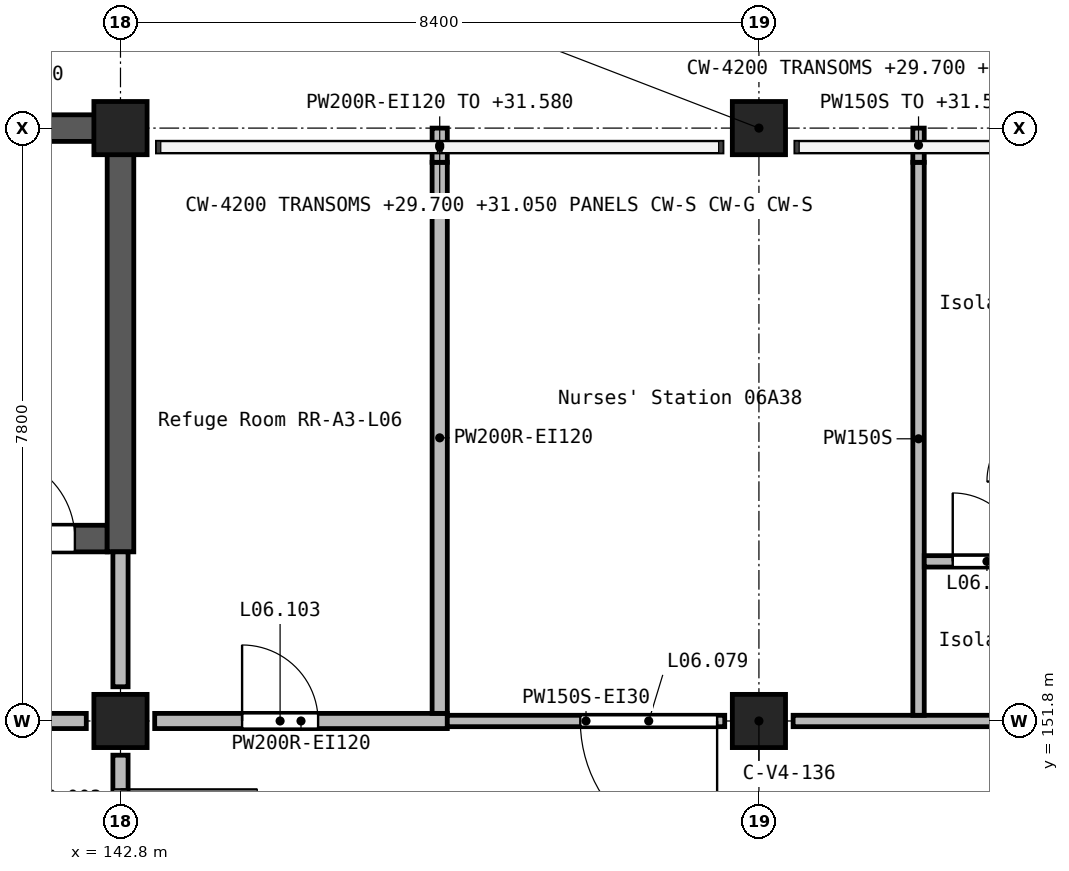
"""IFC4 building model, lengths in metres.
Left out: names, types, materials, properties, quantities, classifications, styles, units other than length and angle.
Written with IfcOpenShell. Run it as: python <this file> out.ifc"""

import sys

from ifc_helpers import new_model, si_unit, direction, frame, frame_2d, origin, origin_2d, place, context, subcontext, project, spatial, rectangle, extrude, element, fill, save


model = new_model("IFC4")
c1 = context("Model", 3, precision=1e-05, world=origin(), true_north=direction((0.0, 1.0)))
c2 = subcontext(c1, "Body", "Model", "MODEL_VIEW")
j1 = project(units=[si_unit("LENGTHUNIT", "METRE"), si_unit("PLANEANGLEUNIT", "RADIAN")], contexts=[c1])
p1 = place(None, origin())
s1 = spatial("IfcSite", under=j1, at=p1, CompositionType="ELEMENT")
p2 = place(p1, origin())
s2 = spatial("IfcBuilding", under=s1, at=p2, CompositionType="ELEMENT")
p3 = place(p2, frame((0.0, 0.0, 28.8)))
s3 = spatial("IfcBuildingStorey", under=s2, at=p3, CompositionType="ELEMENT", Elevation=28.8)
for number, where, z_axis, x_axis in (
    (1, (142.8, 151.8, 0.0), (0.0, 0.0, 1.0), (1.0, 0.0, 0.0)),
    (2, (142.8, 159.6, 0.0), (0.0, 0.0, 1.0), (1.0, 0.0, 0.0)),
    (3, (151.2, 151.8, 0.0), (0.0, 0.0, 1.0), (1.0, 0.0, 0.0)),
    (4, (151.2, 159.6, 0.0), (0.0, 0.0, 1.0), (1.0, 0.0, 0.0)),
):
    element("IfcColumn", number, at=place(p3, frame(where, z_axis=z_axis, x_axis=x_axis)), inside=s3, PredefinedType="COLUMN", context=c2, shape_type="SweptSolid", body=[
        extrude(rectangle(XDim=0.7, YDim=0.7, at=origin_2d()), origin(), (0.0, 0.0, 1.0), 3.9),
    ])
p4 = place(p3, frame((134.225, 159.6, 0.0), z_axis=(0.0, 0.0, 1.0), x_axis=(1.0, 0.0, 0.0)))
e5 = element("IfcWall", 5, at=p4, inside=s3, PredefinedType="SHEAR", context=c2, shape_type="SweptSolid", body=[
    extrude(rectangle(XDim=8.4, YDim=0.35, at=frame_2d((4.2, 0.0))), origin(), (0.0, 0.0, 1.0), 3.9),
])
p5 = place(p3, frame((134.575, 154.2, 0.0), z_axis=(0.0, 0.0, 1.0), x_axis=(1.0, 0.0, 0.0)))
e6 = element("IfcWall", 6, at=p5, inside=s3, PredefinedType="SHEAR", context=c2, shape_type="SweptSolid", body=[
    extrude(rectangle(XDim=8.05, YDim=0.35, at=frame_2d((4.025, 0.0))), origin(), (0.0, 0.0, 1.0), 3.9),
])
p6 = place(p5, frame((6.525, 0.0, 0.0)))
e7 = element("IfcOpeningElement", 7, at=p6, cuts=e6, PredefinedType="OPENING", context=c2, shape_type="SweptSolid", body=[
    extrude(rectangle(XDim=1.1, YDim=2.1, at=frame_2d((0.55, 1.05))), frame((0.0, 0.185, 0.0), z_axis=(0.0, -1.0, 0.0), x_axis=(1.0, 0.0, 0.0)), (0.0, 0.0, 1.0), 0.37),
])
p7 = place(p3, frame((142.8, 154.025, 0.0), z_axis=(0.0, 0.0, 1.0), x_axis=(0.0, 1.0, 0.0)))
e8 = element("IfcWall", 8, at=p7, inside=s3, PredefinedType="SHEAR", context=c2, shape_type="SweptSolid", body=[
    extrude(rectangle(XDim=5.75, YDim=0.35, at=frame_2d((2.875, 0.0))), origin(), (0.0, 0.0, 1.0), 3.9),
])
p8 = place(p3, frame((142.8, 154.025, 0.0), z_axis=(0.0, 0.0, 1.0), x_axis=(0.0, -1.0, 0.0)))
e9 = element("IfcWall", 9, at=p8, inside=s3, PredefinedType="SOLIDWALL", context=c2, shape_type="SweptSolid", body=[
    extrude(rectangle(XDim=1.775, YDim=0.2, at=frame_2d((0.887, 0.0))), origin(), (0.0, 0.0, 1.0), 3.6),
])
p9 = place(p3, frame((142.8, 151.35, 0.0), z_axis=(0.0, 0.0, 1.0), x_axis=(0.0, -1.0, 0.0)))
e10 = element("IfcWall", 10, at=p9, inside=s3, PredefinedType="SOLIDWALL", context=c2, shape_type="SweptSolid", body=[
    extrude(rectangle(XDim=2.7, YDim=0.2, at=frame_2d((1.35, 0.0))), origin(), (0.0, 0.0, 1.0), 3.6),
])
p10 = place(p9, frame((0.45, 0.0, 0.0)))
e11 = element("IfcOpeningElement", 11, at=p10, cuts=e10, PredefinedType="OPENING", context=c2, shape_type="SweptSolid", body=[
    extrude(rectangle(XDim=1.8, YDim=2.1, at=frame_2d((0.9, 1.05))), frame((0.0, 0.11, 0.0), z_axis=(0.0, -1.0, 0.0), x_axis=(1.0, 0.0, 0.0)), (0.0, 0.0, 1.0), 0.22),
])
p11 = place(p3, frame((134.85, 151.8, 0.0), z_axis=(0.0, 0.0, 1.0), x_axis=(1.0, 0.0, 0.0)))
e12 = element("IfcWall", 12, at=p11, inside=s3, PredefinedType="SOLIDWALL", context=c2, shape_type="SweptSolid", body=[
    extrude(rectangle(XDim=7.5, YDim=0.2, at=frame_2d((3.75, 0.0))), origin(), (0.0, 0.0, 1.0), 3.6),
])
p12 = place(p11, frame((3.2, 0.0, 0.0)))
e13 = element("IfcOpeningElement", 13, at=p12, cuts=e12, PredefinedType="OPENING", context=c2, shape_type="SweptSolid", body=[
    extrude(rectangle(XDim=1.1, YDim=2.1, at=frame_2d((0.55, 1.05))), frame((0.0, 0.11, 0.0), z_axis=(0.0, -1.0, 0.0), x_axis=(1.0, 0.0, 0.0)), (0.0, 0.0, 1.0), 0.22),
])
p13 = place(p3, frame((143.25, 151.8, 0.0), z_axis=(0.0, 0.0, 1.0), x_axis=(1.0, 0.0, 0.0)))
e14 = element("IfcWall", 14, at=p13, inside=s3, PredefinedType="SOLIDWALL", context=c2, shape_type="SweptSolid", body=[
    extrude(rectangle(XDim=3.85, YDim=0.2, at=frame_2d((1.925, 0.0))), origin(), (0.0, 0.0, 1.0), 3.6),
])
p14 = place(p13, frame((1.15, 0.0, 0.0)))
e15 = element("IfcOpeningElement", 15, at=p14, cuts=e14, PredefinedType="OPENING", context=c2, shape_type="SweptSolid", body=[
    extrude(rectangle(XDim=1.0, YDim=2.1, at=frame_2d((0.5, 1.05))), frame((0.0, 0.11, 0.0), z_axis=(0.0, -1.0, 0.0), x_axis=(1.0, 0.0, 0.0)), (0.0, 0.0, 1.0), 0.22),
])
p15 = place(p3, frame((147.0, 151.9, 0.0), z_axis=(0.0, 0.0, 1.0), x_axis=(0.0, 1.0, 0.0)))
e16 = element("IfcWall", 16, at=p15, inside=s3, PredefinedType="SOLIDWALL", context=c2, shape_type="SweptSolid", body=[
    extrude(rectangle(XDim=7.25, YDim=0.2, at=frame_2d((3.625, 0.0))), origin(), (0.0, 0.0, 1.0), 3.6),
])
p16 = place(p3, frame((147.0, 159.15, 0.0), z_axis=(0.0, 0.0, 1.0), x_axis=(0.0, 1.0, 0.0)))
e17 = element("IfcWall", 17, at=p16, inside=s3, PredefinedType="SOLIDWALL", context=c2, shape_type="SweptSolid", body=[
    extrude(rectangle(XDim=0.45, YDim=0.2, at=frame_2d((0.225, 0.0))), origin(), (0.0, 0.0, 1.0), 2.78),
])
p17 = place(p3, frame((159.15, 151.8, 0.0), z_axis=(0.0, 0.0, 1.0), x_axis=(-1.0, 0.0, 0.0)))
e18 = element("IfcWall", 18, at=p17, inside=s3, PredefinedType="PARTITIONING", context=c2, shape_type="SweptSolid", body=[
    extrude(rectangle(XDim=7.5, YDim=0.15, at=frame_2d((3.75, 0.0))), origin(), (0.0, 0.0, 1.0), 3.6),
])
p18 = place(p17, frame((3.3, 0.0, 0.0)))
e19 = element("IfcOpeningElement", 19, at=p18, cuts=e18, PredefinedType="OPENING", context=c2, shape_type="SweptSolid", body=[
    extrude(rectangle(XDim=0.9, YDim=2.1, at=frame_2d((0.45, 1.05))), frame((0.0, 0.085, 0.0), z_axis=(0.0, -1.0, 0.0), x_axis=(1.0, 0.0, 0.0)), (0.0, 0.0, 1.0), 0.17),
])
p19 = place(p3, frame((150.75, 151.8, 0.0), z_axis=(0.0, 0.0, 1.0), x_axis=(-1.0, 0.0, 0.0)))
e20 = element("IfcWall", 20, at=p19, inside=s3, PredefinedType="PARTITIONING", context=c2, shape_type="SweptSolid", body=[
    extrude(rectangle(XDim=3.65, YDim=0.15, at=frame_2d((1.825, 0.0))), origin(), (0.0, 0.0, 1.0), 3.6),
])
p20 = place(p19, frame((0.1, 0.0, 0.0)))
e21 = element("IfcOpeningElement", 21, at=p20, cuts=e20, PredefinedType="OPENING", context=c2, shape_type="SweptSolid", body=[
    extrude(rectangle(XDim=1.8, YDim=2.1, at=frame_2d((0.9, 1.05))), frame((0.0, 0.085, 0.0), z_axis=(0.0, -1.0, 0.0), x_axis=(1.0, 0.0, 0.0)), (0.0, 0.0, 1.0), 0.17),
])
p21 = place(p3, frame((153.3, 151.875, 0.0), z_axis=(0.0, 0.0, 1.0), x_axis=(0.0, 1.0, 0.0)))
e22 = element("IfcWall", 22, at=p21, inside=s3, PredefinedType="PARTITIONING", context=c2, shape_type="SweptSolid", body=[
    extrude(rectangle(XDim=7.275, YDim=0.15, at=frame_2d((3.637, 0.0))), origin(), (0.0, 0.0, 1.0), 3.6),
])
p22 = place(p3, frame((153.3, 159.15, 0.0), z_axis=(0.0, 0.0, 1.0), x_axis=(0.0, 1.0, 0.0)))
e23 = element("IfcWall", 23, at=p22, inside=s3, PredefinedType="PARTITIONING", context=c2, shape_type="SweptSolid", body=[
    extrude(rectangle(XDim=0.45, YDim=0.15, at=frame_2d((0.225, 0.0))), origin(), (0.0, 0.0, 1.0), 2.78),
])
p23 = place(p3, frame((153.375, 153.9, 0.0), z_axis=(0.0, 0.0, 1.0), x_axis=(1.0, 0.0, 0.0)))
e24 = element("IfcWall", 24, at=p23, inside=s3, PredefinedType="PARTITIONING", context=c2, shape_type="SweptSolid", body=[
    extrude(rectangle(XDim=4.2, YDim=0.15, at=frame_2d((2.1, 0.0))), origin(), (0.0, 0.0, 1.0), 3.6),
])
p24 = place(p23, frame((0.375, 0.0, 0.0)))
e25 = element("IfcOpeningElement", 25, at=p24, cuts=e24, PredefinedType="OPENING", context=c2, shape_type="SweptSolid", body=[
    extrude(rectangle(XDim=0.9, YDim=2.1, at=frame_2d((0.45, 1.05))), frame((0.0, 0.085, 0.0), z_axis=(0.0, -1.0, 0.0), x_axis=(1.0, 0.0, 0.0)), (0.0, 0.0, 1.0), 0.17),
])
p25 = place(p10, origin())
e26 = element("IfcDoor", 26, at=p25, inside=s3, OperationType="DOUBLE_DOOR_SINGLE_SWING", PredefinedType="DOOR", context=c2, shape_type="SweptSolid", body=[
    extrude(rectangle(XDim=1.8, YDim=2.1, at=frame_2d((0.9, 1.05))), frame((0.0, 0.025, 0.0), z_axis=(0.0, -1.0, 0.0), x_axis=(1.0, 0.0, 0.0)), (0.0, 0.0, 1.0), 0.05),
])
fill(e11, e26)
p26 = place(p20, frame((1.8, 0.0, 0.0), z_axis=(0.0, 0.0, 1.0), x_axis=(-1.0, 0.0, 0.0)))
e27 = element("IfcDoor", 27, at=p26, inside=s3, OperationType="DOUBLE_DOOR_SINGLE_SWING", PredefinedType="DOOR", context=c2, shape_type="SweptSolid", body=[
    extrude(rectangle(XDim=1.8, YDim=2.1, at=frame_2d((0.9, 1.05))), frame((0.0, 0.025, 0.0), z_axis=(0.0, -1.0, 0.0), x_axis=(1.0, 0.0, 0.0)), (0.0, 0.0, 1.0), 0.05),
])
fill(e21, e27)
p27 = place(p24, origin())
e28 = element("IfcDoor", 28, at=p27, inside=s3, OperationType="SINGLE_SWING_LEFT", PredefinedType="DOOR", context=c2, shape_type="SweptSolid", body=[
    extrude(rectangle(XDim=0.9, YDim=2.1, at=frame_2d((0.45, 1.05))), frame((0.0, 0.025, 0.0), z_axis=(0.0, -1.0, 0.0), x_axis=(1.0, 0.0, 0.0)), (0.0, 0.0, 1.0), 0.05),
])
fill(e25, e28)
p28 = place(p14, origin())
e29 = element("IfcDoor", 29, at=p28, inside=s3, OperationType="SINGLE_SWING_LEFT", PredefinedType="DOOR", context=c2, shape_type="SweptSolid", body=[
    extrude(rectangle(XDim=1.0, YDim=2.1, at=frame_2d((0.5, 1.05))), frame((0.0, 0.025, 0.0), z_axis=(0.0, -1.0, 0.0), x_axis=(1.0, 0.0, 0.0)), (0.0, 0.0, 1.0), 0.05),
])
fill(e15, e29)
p29 = place(p6, origin())
e30 = element("IfcDoor", 30, at=p29, inside=s3, OperationType="SINGLE_SWING_RIGHT", PredefinedType="DOOR", context=c2, shape_type="SweptSolid", body=[
    extrude(rectangle(XDim=1.1, YDim=2.1, at=frame_2d((0.55, 1.05))), frame((0.0, 0.025, 0.0), z_axis=(0.0, -1.0, 0.0), x_axis=(1.0, 0.0, 0.0)), (0.0, 0.0, 1.0), 0.05),
])
fill(e7, e30)
save(model, sys.argv[1])
